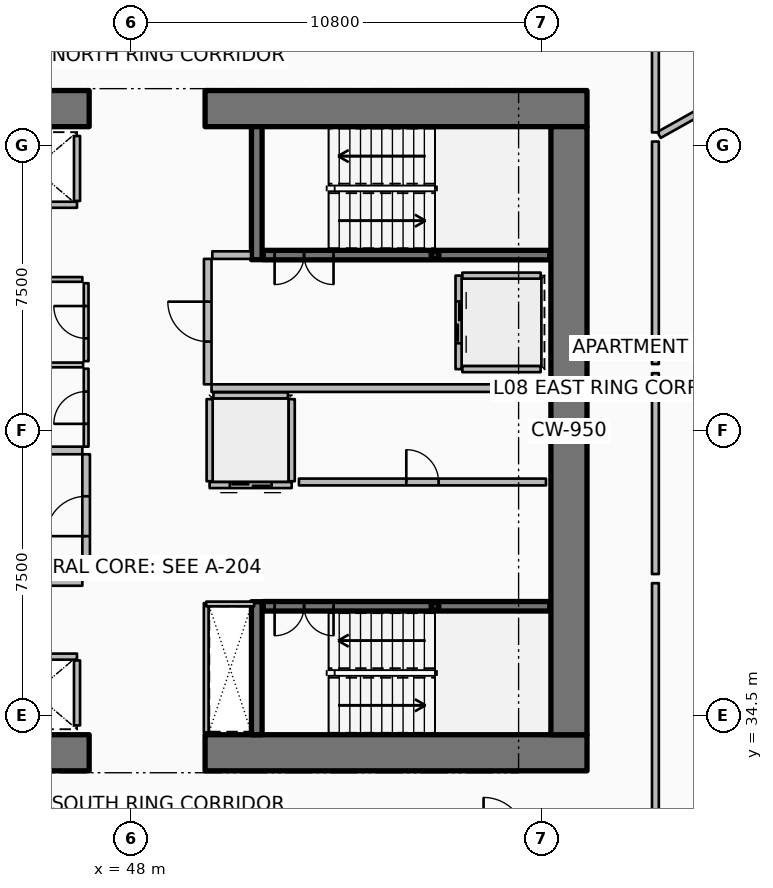
"""IFC4 building model, lengths in metres.
Left out: names, types, materials, properties, quantities, classifications, styles, units other than length and angle.
Written with IfcOpenShell. Run it as: python <this file> out.ifc"""

import sys

from ifc_helpers import new_model, si_unit, direction, frame, frame_2d, origin, origin_2d, place, context, subcontext, project, spatial, rectangle, hollow_rectangle, extrude, element, fill, save


model = new_model("IFC4")
c1 = context("Model", 3, precision=1e-05, world=origin(), true_north=direction((0.0, 1.0)))
c2 = subcontext(c1, "Body", "Model", "MODEL_VIEW")
j1 = project(units=[si_unit("LENGTHUNIT", "METRE"), si_unit("PLANEANGLEUNIT", "RADIAN")], contexts=[c1])
p1 = place(None, origin())
s1 = spatial("IfcSite", under=j1, at=p1, CompositionType="ELEMENT")
p2 = place(p1, origin())
s2 = spatial("IfcBuilding", under=s1, at=p2, CompositionType="ELEMENT")
p3 = place(p2, frame((0.0, 0.0, 37.65)))
s3 = spatial("IfcBuildingStorey", under=s2, at=p3, CompositionType="ELEMENT", Elevation=37.65)
p4 = place(p3, frame((36.85, 33.525, 0.0), z_axis=(0.0, 0.0, 1.0), x_axis=(1.0, 0.0, 0.0)))
e1 = element("IfcWall", 1, at=p4, inside=s3, PredefinedType="SHEAR", context=c2, shape_type="SweptSolid", body=[
    extrude(rectangle(XDim=10.05, YDim=0.95, at=frame_2d((5.025, 0.0))), origin(), (0.0, 0.0, 1.0), 3.75),
])
p5 = place(p3, frame((49.95, 33.525, 0.0), z_axis=(0.0, 0.0, 1.0), x_axis=(1.0, 0.0, 0.0)))
e2 = element("IfcWall", 2, at=p5, inside=s3, PredefinedType="SHEAR", context=c2, shape_type="SweptSolid", body=[
    extrude(rectangle(XDim=10.05, YDim=0.95, at=frame_2d((5.025, 0.0))), origin(), (0.0, 0.0, 1.0), 3.75),
])
p6 = place(p3, frame((36.85, 50.475, 0.0), z_axis=(0.0, 0.0, 1.0), x_axis=(1.0, 0.0, 0.0)))
e3 = element("IfcWall", 3, at=p6, inside=s3, PredefinedType="SHEAR", context=c2, shape_type="SweptSolid", body=[
    extrude(rectangle(XDim=10.05, YDim=0.95, at=frame_2d((5.025, 0.0))), origin(), (0.0, 0.0, 1.0), 3.75),
])
p7 = place(p3, frame((49.95, 50.475, 0.0), z_axis=(0.0, 0.0, 1.0), x_axis=(1.0, 0.0, 0.0)))
e4 = element("IfcWall", 4, at=p7, inside=s3, PredefinedType="SHEAR", context=c2, shape_type="SweptSolid", body=[
    extrude(rectangle(XDim=10.05, YDim=0.95, at=frame_2d((5.025, 0.0))), origin(), (0.0, 0.0, 1.0), 3.75),
])
p8 = place(p3, frame((59.525, 34.0, 0.0), z_axis=(0.0, 0.0, 1.0), x_axis=(0.0, 1.0, 0.0)))
e5 = element("IfcWall", 5, at=p8, inside=s3, PredefinedType="SHEAR", context=c2, shape_type="SweptSolid", body=[
    extrude(rectangle(XDim=16.0, YDim=0.95, at=frame_2d((8.0, 0.0))), origin(), (0.0, 0.0, 1.0), 3.75),
])
for number, where, z_axis, x_axis in (
    (6, (51.31, 46.5, 0.0), (0.0, 0.0, 1.0), (0.0, 1.0, 0.0)),
    (7, (51.31, 34.0, 0.0), (0.0, 0.0, 1.0), (0.0, 1.0, 0.0)),
):
    element("IfcWall", number, at=place(p3, frame(where, z_axis=z_axis, x_axis=x_axis)), inside=s3, PredefinedType="SHEAR", context=c2, shape_type="SweptSolid", body=[
        extrude(rectangle(XDim=3.5, YDim=0.28, at=frame_2d((1.75, 0.0))), origin(), (0.0, 0.0, 1.0), 3.75),
    ])
for number, where, z_axis, x_axis in (
    (8, (56.0, 46.62, 0.0), (0.0, 0.0, 1.0), (1.0, 0.0, 0.0)),
    (9, (56.0, 37.38, 0.0), (0.0, 0.0, 1.0), (1.0, 0.0, 0.0)),
):
    element("IfcColumn", number, at=place(p3, frame(where, z_axis=z_axis, x_axis=x_axis)), inside=s3, PredefinedType="COLUMN", context=c2, shape_type="SweptSolid", body=[
        extrude(hollow_rectangle(XDim=0.2, YDim=0.2, WallThickness=0.01, InnerFilletRadius=0.01, OuterFilletRadius=0.02, at=origin_2d()), origin(), (0.0, 0.0, 1.0), 1.67),
    ])
p9 = place(p3, frame((51.48, 46.62, 0.0), z_axis=(0.0, 0.0, 1.0), x_axis=(1.0, 0.0, 0.0)))
e10 = element("IfcWall", 10, at=p9, inside=s3, PredefinedType="SOLIDWALL", context=c2, shape_type="SweptSolid", body=[
    extrude(rectangle(XDim=7.54, YDim=0.25, at=frame_2d((3.77, 0.0))), origin(), (0.0, 0.0, 1.0), 3.5),
])
p10 = place(p9, frame((0.3, 0.0, 0.0)))
e11 = element("IfcOpeningElement", 11, at=p10, cuts=e10, PredefinedType="OPENING", context=c2, shape_type="SweptSolid", body=[
    extrude(rectangle(XDim=1.55, YDim=2.15, at=frame_2d((0.775, 1.075))), frame((0.0, 0.135, 0.0), z_axis=(0.0, -1.0, 0.0), x_axis=(1.0, 0.0, 0.0)), (0.0, 0.0, 1.0), 0.27),
])
p11 = place(p3, frame((51.48, 37.38, 0.0), z_axis=(0.0, 0.0, 1.0), x_axis=(1.0, 0.0, 0.0)))
e12 = element("IfcWall", 12, at=p11, inside=s3, PredefinedType="SOLIDWALL", context=c2, shape_type="SweptSolid", body=[
    extrude(rectangle(XDim=7.54, YDim=0.25, at=frame_2d((3.77, 0.0))), origin(), (0.0, 0.0, 1.0), 3.5),
])
p12 = place(p11, frame((0.3, 0.0, 0.0)))
e13 = element("IfcOpeningElement", 13, at=p12, cuts=e12, PredefinedType="OPENING", context=c2, shape_type="SweptSolid", body=[
    extrude(rectangle(XDim=1.55, YDim=2.15, at=frame_2d((0.775, 1.075))), frame((0.0, 0.135, 0.0), z_axis=(0.0, -1.0, 0.0), x_axis=(1.0, 0.0, 0.0)), (0.0, 0.0, 1.0), 0.27),
])
p13 = place(p3, frame((46.58, 47.945, 0.0), z_axis=(0.0, 0.0, 1.0), x_axis=(-1.0, 0.0, 0.0)))
e14 = element("IfcWall", 14, at=p13, inside=s3, PredefinedType="PARTITIONING", context=c2, shape_type="SweptSolid", body=[
    extrude(rectangle(XDim=2.26, YDim=0.16, at=frame_2d((1.13, 0.0))), origin(), (0.0, 0.0, 1.0), 3.5),
])
p14 = place(p3, frame((46.58, 48.045, 0.0), z_axis=(0.0, 0.0, 1.0), x_axis=(0.0, 1.0, 0.0)))
e15 = element("IfcWall", 15, at=p14, inside=s3, PredefinedType="PARTITIONING", context=c2, shape_type="SweptSolid", body=[
    extrude(rectangle(XDim=1.71, YDim=0.16, at=frame_2d((0.855, 0.0))), origin(), (0.0, 0.0, 1.0), 3.5),
])
p15 = place(p3, frame((44.32, 36.055, 0.0), z_axis=(0.0, 0.0, 1.0), x_axis=(1.0, 0.0, 0.0)))
e16 = element("IfcWall", 16, at=p15, inside=s3, PredefinedType="PARTITIONING", context=c2, shape_type="SweptSolid", body=[
    extrude(rectangle(XDim=2.26, YDim=0.16, at=frame_2d((1.13, 0.0))), origin(), (0.0, 0.0, 1.0), 3.5),
])
p16 = place(p3, frame((46.58, 34.245, 0.0), z_axis=(0.0, 0.0, 1.0), x_axis=(0.0, 1.0, 0.0)))
e17 = element("IfcWall", 17, at=p16, inside=s3, PredefinedType="PARTITIONING", context=c2, shape_type="SweptSolid", body=[
    extrude(rectangle(XDim=1.71, YDim=0.16, at=frame_2d((0.855, 0.0))), origin(), (0.0, 0.0, 1.0), 3.5),
])
p17 = place(p3, frame((56.62, 46.08, 0.0), z_axis=(0.0, 0.0, 1.0), x_axis=(0.0, -1.0, 0.0)))
e18 = element("IfcWall", 18, at=p17, inside=s3, PredefinedType="PARTITIONING", context=c2, shape_type="SweptSolid", body=[
    extrude(rectangle(XDim=2.46, YDim=0.16, at=frame_2d((1.23, 0.0))), origin(), (0.0, 0.0, 1.0), 3.5),
])
p18 = place(p17, frame((0.68, 0.0, 0.0)))
e19 = element("IfcOpeningElement", 19, at=p18, cuts=e18, PredefinedType="OPENING", context=c2, shape_type="SweptSolid", body=[
    extrude(rectangle(XDim=1.1, YDim=2.1, at=frame_2d((0.55, 1.05))), frame((0.0, 0.09, 0.0), z_axis=(0.0, -1.0, 0.0), x_axis=(1.0, 0.0, 0.0)), (0.0, 0.0, 1.0), 0.18),
])
for number, where, z_axis, x_axis in (
    (20, (56.72, 46.08, 0.0), (0.0, 0.0, 1.0), (1.0, 0.0, 0.0)),
    (21, (56.72, 43.62, 0.0), (0.0, 0.0, 1.0), (1.0, 0.0, 0.0)),
):
    element("IfcWall", number, at=place(p3, frame(where, z_axis=z_axis, x_axis=x_axis)), inside=s3, PredefinedType="PARTITIONING", context=c2, shape_type="SweptSolid", body=[
        extrude(rectangle(XDim=2.06, YDim=0.16, at=frame_2d((1.03, 0.0))), origin(), (0.0, 0.0, 1.0), 3.5),
    ])
p19 = place(p3, frame((52.23, 40.57, 0.0), z_axis=(0.0, 0.0, 1.0), x_axis=(-1.0, 0.0, 0.0)))
e22 = element("IfcWall", 22, at=p19, inside=s3, PredefinedType="PARTITIONING", context=c2, shape_type="SweptSolid", body=[
    extrude(rectangle(XDim=2.16, YDim=0.16, at=frame_2d((1.08, 0.0))), origin(), (0.0, 0.0, 1.0), 3.5),
])
p20 = place(p19, frame((0.53, 0.0, 0.0)))
e23 = element("IfcOpeningElement", 23, at=p20, cuts=e22, PredefinedType="OPENING", context=c2, shape_type="SweptSolid", body=[
    extrude(rectangle(XDim=1.1, YDim=2.1, at=frame_2d((0.55, 1.05))), frame((0.0, 0.09, 0.0), z_axis=(0.0, -1.0, 0.0), x_axis=(1.0, 0.0, 0.0)), (0.0, 0.0, 1.0), 0.18),
])
for number, where, z_axis, x_axis in (
    (24, (52.23, 40.67, 0.0), (0.0, 0.0, 1.0), (0.0, 1.0, 0.0)),
    (25, (50.07, 40.67, 0.0), (0.0, 0.0, 1.0), (0.0, 1.0, 0.0)),
):
    element("IfcWall", number, at=place(p3, frame(where, z_axis=z_axis, x_axis=x_axis)), inside=s3, PredefinedType="PARTITIONING", context=c2, shape_type="SweptSolid", body=[
        extrude(rectangle(XDim=2.16, YDim=0.16, at=frame_2d((1.08, 0.0))), origin(), (0.0, 0.0, 1.0), 3.5),
    ])
p21 = place(p3, frame((50.17, 42.93, 0.0), z_axis=(0.0, 0.0, 1.0), x_axis=(1.0, 0.0, 0.0)))
e26 = element("IfcWall", 26, at=p21, inside=s3, PredefinedType="PARTITIONING", context=c2, shape_type="SweptSolid", body=[
    extrude(rectangle(XDim=1.96, YDim=0.16, at=frame_2d((0.98, 0.0))), origin(), (0.0, 0.0, 1.0), 3.5),
])
p22 = place(p3, frame((52.42, 40.65, 0.0), z_axis=(0.0, 0.0, 1.0), x_axis=(1.0, 0.0, 0.0)))
e27 = element("IfcWall", 27, at=p22, inside=s3, PredefinedType="PARTITIONING", context=c2, shape_type="SweptSolid", body=[
    extrude(rectangle(XDim=6.5, YDim=0.18, at=frame_2d((3.25, 0.0))), origin(), (0.0, 0.0, 1.0), 3.5),
])
p23 = place(p22, frame((2.825, 0.0, 0.0)))
e28 = element("IfcOpeningElement", 28, at=p23, cuts=e27, PredefinedType="OPENING", context=c2, shape_type="SweptSolid", body=[
    extrude(rectangle(XDim=0.85, YDim=2.06, at=frame_2d((0.425, 1.03))), frame((0.0, 0.1, 0.0), z_axis=(0.0, -1.0, 0.0), x_axis=(1.0, 0.0, 0.0)), (0.0, 0.0, 1.0), 0.2),
])
p24 = place(p3, frame((41.35, 38.02, 0.0), z_axis=(0.0, 0.0, 1.0), x_axis=(1.0, 0.0, 0.0)))
e29 = element("IfcWall", 29, at=p24, inside=s3, PredefinedType="PARTITIONING", context=c2, shape_type="SweptSolid", body=[
    extrude(rectangle(XDim=5.37, YDim=0.2, at=frame_2d((2.685, 0.0))), origin(), (0.0, 0.0, 1.0), 3.5),
])
p25 = place(p3, frame((43.92, 41.48, 0.0), z_axis=(0.0, 0.0, 1.0), x_axis=(1.0, 0.0, 0.0)))
e30 = element("IfcWall", 30, at=p25, inside=s3, PredefinedType="PARTITIONING", context=c2, shape_type="SweptSolid", body=[
    extrude(rectangle(XDim=2.8, YDim=0.2, at=frame_2d((1.4, 0.0))), origin(), (0.0, 0.0, 1.0), 3.5),
])
p26 = place(p3, frame((46.82, 38.12, 0.0), z_axis=(0.0, 0.0, 1.0), x_axis=(0.0, 1.0, 0.0)))
e31 = element("IfcWall", 31, at=p26, inside=s3, PredefinedType="PARTITIONING", context=c2, shape_type="SweptSolid", body=[
    extrude(rectangle(XDim=3.26, YDim=0.2, at=frame_2d((1.63, 0.0))), origin(), (0.0, 0.0, 1.0), 3.5),
])
p27 = place(p26, frame((1.105, 0.0, 0.0)))
e32 = element("IfcOpeningElement", 32, at=p27, cuts=e31, PredefinedType="OPENING", context=c2, shape_type="SweptSolid", body=[
    extrude(rectangle(XDim=1.05, YDim=2.1, at=frame_2d((0.525, 1.05))), frame((0.0, 0.11, 0.0), z_axis=(0.0, -1.0, 0.0), x_axis=(1.0, 0.0, 0.0)), (0.0, 0.0, 1.0), 0.22),
])
p28 = place(p3, frame((50.12, 43.12, 0.0), z_axis=(0.0, 0.0, 1.0), x_axis=(1.0, 0.0, 0.0)))
e33 = element("IfcWall", 33, at=p28, inside=s3, PredefinedType="PARTITIONING", context=c2, shape_type="SweptSolid", body=[
    extrude(rectangle(XDim=8.88, YDim=0.2, at=frame_2d((4.44, 0.0))), origin(), (0.0, 0.0, 1.0), 3.5),
])
p29 = place(p3, frame((50.14, 46.62, 0.0), z_axis=(0.0, 0.0, 1.0), x_axis=(1.0, 0.0, 0.0)))
e34 = element("IfcWall", 34, at=p29, inside=s3, PredefinedType="PARTITIONING", context=c2, shape_type="SweptSolid", body=[
    extrude(rectangle(XDim=1.02, YDim=0.2, at=frame_2d((0.51, 0.0))), origin(), (0.0, 0.0, 1.0), 3.5),
])
p30 = place(p3, frame((50.02, 43.22, 0.0), z_axis=(0.0, 0.0, 1.0), x_axis=(0.0, 1.0, 0.0)))
e35 = element("IfcWall", 35, at=p30, inside=s3, PredefinedType="PARTITIONING", context=c2, shape_type="SweptSolid", body=[
    extrude(rectangle(XDim=3.3, YDim=0.2, at=frame_2d((1.65, 0.0))), origin(), (0.0, 0.0, 1.0), 3.5),
])
p31 = place(p30, frame((1.125, 0.0, 0.0)))
e36 = element("IfcOpeningElement", 36, at=p31, cuts=e35, PredefinedType="OPENING", context=c2, shape_type="SweptSolid", body=[
    extrude(rectangle(XDim=1.05, YDim=2.1, at=frame_2d((0.525, 1.05))), frame((0.0, 0.11, 0.0), z_axis=(0.0, -1.0, 0.0), x_axis=(1.0, 0.0, 0.0)), (0.0, 0.0, 1.0), 0.22),
])
p32 = place(p3, frame((41.36, 45.98, 0.0), z_axis=(0.0, 0.0, 1.0), x_axis=(1.0, 0.0, 0.0)))
e37 = element("IfcWall", 37, at=p32, inside=s3, PredefinedType="PARTITIONING", context=c2, shape_type="SweptSolid", body=[
    extrude(rectangle(XDim=5.36, YDim=0.125, at=frame_2d((2.68, 0.0))), origin(), (0.0, 0.0, 1.0), 2.94),
])
p33 = place(p3, frame((49.98, 34.06, 0.0), z_axis=(0.0, 0.0, 1.0), x_axis=(0.0, 1.0, 0.0)))
e38 = element("IfcWall", 38, at=p33, inside=s3, PredefinedType="PARTITIONING", context=c2, shape_type="SweptSolid", body=[
    extrude(rectangle(XDim=3.4, YDim=0.125, at=frame_2d((1.7, 0.0))), origin(), (0.0, 0.0, 1.0), 2.94),
])
p34 = place(p3, frame((49.98, 37.44, 0.0), z_axis=(0.0, 0.0, 1.0), x_axis=(1.0, 0.0, 0.0)))
e39 = element("IfcWall", 39, at=p34, inside=s3, PredefinedType="PARTITIONING", context=c2, shape_type="SweptSolid", body=[
    extrude(rectangle(XDim=1.26, YDim=0.125, at=frame_2d((0.63, 0.0))), origin(), (0.0, 0.0, 1.0), 2.94),
])
p35 = place(p3, frame((44.03, 43.73, 0.0), z_axis=(0.0, 0.0, 1.0), x_axis=(1.0, 0.0, 0.0)))
e40 = element("IfcWall", 40, at=p35, inside=s3, PredefinedType="PARTITIONING", context=c2, shape_type="SweptSolid", body=[
    extrude(rectangle(XDim=2.71, YDim=0.125, at=frame_2d((1.355, 0.0))), origin(), (0.0, 0.0, 1.0), 2.94),
])
p36 = place(p3, frame((46.82, 41.58, 0.0), z_axis=(0.0, 0.0, 1.0), x_axis=(0.0, 1.0, 0.0)))
e41 = element("IfcWall", 41, at=p36, inside=s3, PredefinedType="PARTITIONING", context=c2, shape_type="SweptSolid", body=[
    extrude(rectangle(XDim=2.05, YDim=0.125, at=frame_2d((1.025, 0.0))), origin(), (0.0, 0.0, 1.0), 2.94),
])
p37 = place(p36, frame((0.6, 0.0, 0.0)))
e42 = element("IfcOpeningElement", 42, at=p37, cuts=e41, PredefinedType="OPENING", context=c2, shape_type="SweptSolid", body=[
    extrude(rectangle(XDim=0.85, YDim=2.06, at=frame_2d((0.425, 1.03))), frame((0.0, 0.073, 0.0), z_axis=(0.0, -1.0, 0.0), x_axis=(1.0, 0.0, 0.0)), (0.0, 0.0, 1.0), 0.145),
])
p38 = place(p3, frame((46.82, 43.83, 0.0), z_axis=(0.0, 0.0, 1.0), x_axis=(0.0, 1.0, 0.0)))
e43 = element("IfcWall", 43, at=p38, inside=s3, PredefinedType="PARTITIONING", context=c2, shape_type="SweptSolid", body=[
    extrude(rectangle(XDim=2.05, YDim=0.125, at=frame_2d((1.025, 0.0))), origin(), (0.0, 0.0, 1.0), 2.94),
])
p39 = place(p38, frame((0.6, 0.0, 0.0)))
e44 = element("IfcOpeningElement", 44, at=p39, cuts=e43, PredefinedType="OPENING", context=c2, shape_type="SweptSolid", body=[
    extrude(rectangle(XDim=0.85, YDim=2.06, at=frame_2d((0.425, 1.03))), frame((0.0, 0.073, 0.0), z_axis=(0.0, -1.0, 0.0), x_axis=(1.0, 0.0, 0.0)), (0.0, 0.0, 1.0), 0.145),
])
p40 = place(p3, frame((61.896, 49.782, 0.0), z_axis=(0.0, 0.0, 1.0), x_axis=(0.872493215695, 0.488626225828, 0.0)))
e45 = element("IfcWall", 45, at=p40, inside=s3, PredefinedType="PARTITIONING", context=c2, shape_type="SweptSolid", body=[
    extrude(rectangle(XDim=15.612, YDim=0.18, at=frame_2d((7.806, 0.0))), origin(), (0.0, 0.0, 1.0), 2.867),
])
p41 = place(p3, frame((61.8, 49.848, 0.0), z_axis=(0.0, 0.0, 1.0), x_axis=(0.0, 1.0, 0.0)))
e46 = element("IfcWall", 46, at=p41, inside=s3, PredefinedType="PARTITIONING", context=c2, shape_type="SweptSolid", body=[
    extrude(rectangle(XDim=2.781, YDim=0.18, at=frame_2d((1.391, 0.0))), origin(), (0.0, 0.0, 1.0), 2.867),
])
p42 = place(p3, frame((61.8, 31.37, 0.0), z_axis=(0.0, 0.0, 1.0), x_axis=(0.0, 1.0, 0.0)))
e47 = element("IfcWall", 47, at=p42, inside=s3, PredefinedType="PARTITIONING", context=c2, shape_type="SweptSolid", body=[
    extrude(rectangle(XDim=6.618, YDim=0.18, at=frame_2d((3.309, 0.0))), origin(), (0.0, 0.0, 1.0), 2.867),
])
p43 = place(p3, frame((61.8, 38.228, 0.0), z_axis=(0.0, 0.0, 1.0), x_axis=(0.0, 1.0, 0.0)))
e48 = element("IfcWall", 48, at=p43, inside=s3, PredefinedType="PARTITIONING", context=c2, shape_type="SweptSolid", body=[
    extrude(rectangle(XDim=5.285, YDim=0.18, at=frame_2d((2.643, 0.0))), origin(), (0.0, 0.0, 1.0), 2.867),
])
p44 = place(p3, frame((61.8, 43.753, 0.0), z_axis=(0.0, 0.0, 1.0), x_axis=(0.0, 1.0, 0.0)))
e49 = element("IfcWall", 49, at=p44, inside=s3, PredefinedType="PARTITIONING", context=c2, shape_type="SweptSolid", body=[
    extrude(rectangle(XDim=5.855, YDim=0.18, at=frame_2d((2.927, 0.0))), origin(), (0.0, 0.0, 1.0), 2.867),
])
p45 = place(p10, origin())
e50 = element("IfcDoor", 50, at=p45, inside=s3, OperationType="DOUBLE_DOOR_SINGLE_SWING", PredefinedType="DOOR", context=c2, shape_type="SweptSolid", body=[
    extrude(rectangle(XDim=1.55, YDim=2.15, at=frame_2d((0.775, 1.075))), frame((0.0, 0.025, 0.0), z_axis=(0.0, -1.0, 0.0), x_axis=(1.0, 0.0, 0.0)), (0.0, 0.0, 1.0), 0.05),
])
fill(e11, e50)
p46 = place(p12, origin())
e51 = element("IfcDoor", 51, at=p46, inside=s3, OperationType="DOUBLE_DOOR_SINGLE_SWING", PredefinedType="DOOR", context=c2, shape_type="SweptSolid", body=[
    extrude(rectangle(XDim=1.55, YDim=2.15, at=frame_2d((0.775, 1.075))), frame((0.0, 0.025, 0.0), z_axis=(0.0, -1.0, 0.0), x_axis=(1.0, 0.0, 0.0)), (0.0, 0.0, 1.0), 0.05),
])
fill(e13, e51)
p47 = place(p18, origin())
e52 = element("IfcDoor", 52, at=p47, inside=s3, OperationType="DOUBLE_DOOR_SLIDING", PredefinedType="DOOR", context=c2, shape_type="SweptSolid", body=[
    extrude(rectangle(XDim=1.1, YDim=2.1, at=frame_2d((0.55, 1.05))), frame((0.0, 0.025, 0.0), z_axis=(0.0, -1.0, 0.0), x_axis=(1.0, 0.0, 0.0)), (0.0, 0.0, 1.0), 0.05),
])
fill(e19, e52)
p48 = place(p20, origin())
e53 = element("IfcDoor", 53, at=p48, inside=s3, OperationType="DOUBLE_DOOR_SLIDING", PredefinedType="DOOR", context=c2, shape_type="SweptSolid", body=[
    extrude(rectangle(XDim=1.1, YDim=2.1, at=frame_2d((0.55, 1.05))), frame((0.0, 0.025, 0.0), z_axis=(0.0, -1.0, 0.0), x_axis=(1.0, 0.0, 0.0)), (0.0, 0.0, 1.0), 0.05),
])
fill(e23, e53)
p49 = place(p23, origin())
e54 = element("IfcDoor", 54, at=p49, inside=s3, OperationType="SINGLE_SWING_LEFT", PredefinedType="DOOR", context=c2, shape_type="SweptSolid", body=[
    extrude(rectangle(XDim=0.85, YDim=2.06, at=frame_2d((0.425, 1.03))), frame((0.0, 0.025, 0.0), z_axis=(0.0, -1.0, 0.0), x_axis=(1.0, 0.0, 0.0)), (0.0, 0.0, 1.0), 0.05),
])
fill(e28, e54)
p50 = place(p27, origin())
e55 = element("IfcDoor", 55, at=p50, inside=s3, OperationType="SINGLE_SWING_LEFT", PredefinedType="DOOR", context=c2, shape_type="SweptSolid", body=[
    extrude(rectangle(XDim=1.05, YDim=2.1, at=frame_2d((0.525, 1.05))), frame((0.0, 0.025, 0.0), z_axis=(0.0, -1.0, 0.0), x_axis=(1.0, 0.0, 0.0)), (0.0, 0.0, 1.0), 0.05),
])
fill(e32, e55)
p51 = place(p31, origin())
e56 = element("IfcDoor", 56, at=p51, inside=s3, OperationType="SINGLE_SWING_RIGHT", PredefinedType="DOOR", context=c2, shape_type="SweptSolid", body=[
    extrude(rectangle(XDim=1.05, YDim=2.1, at=frame_2d((0.525, 1.05))), frame((0.0, 0.025, 0.0), z_axis=(0.0, -1.0, 0.0), x_axis=(1.0, 0.0, 0.0)), (0.0, 0.0, 1.0), 0.05),
])
fill(e36, e56)
p52 = place(p37, origin())
e57 = element("IfcDoor", 57, at=p52, inside=s3, OperationType="SINGLE_SWING_LEFT", PredefinedType="DOOR", context=c2, shape_type="SweptSolid", body=[
    extrude(rectangle(XDim=0.85, YDim=2.06, at=frame_2d((0.425, 1.03))), frame((0.0, 0.025, 0.0), z_axis=(0.0, -1.0, 0.0), x_axis=(1.0, 0.0, 0.0)), (0.0, 0.0, 1.0), 0.05),
])
fill(e42, e57)
p53 = place(p39, origin())
e58 = element("IfcDoor", 58, at=p53, inside=s3, OperationType="SINGLE_SWING_RIGHT", PredefinedType="DOOR", context=c2, shape_type="SweptSolid", body=[
    extrude(rectangle(XDim=0.85, YDim=2.06, at=frame_2d((0.425, 1.03))), frame((0.0, 0.025, 0.0), z_axis=(0.0, -1.0, 0.0), x_axis=(1.0, 0.0, 0.0)), (0.0, 0.0, 1.0), 0.05),
])
fill(e44, e58)
save(model, sys.argv[1])
